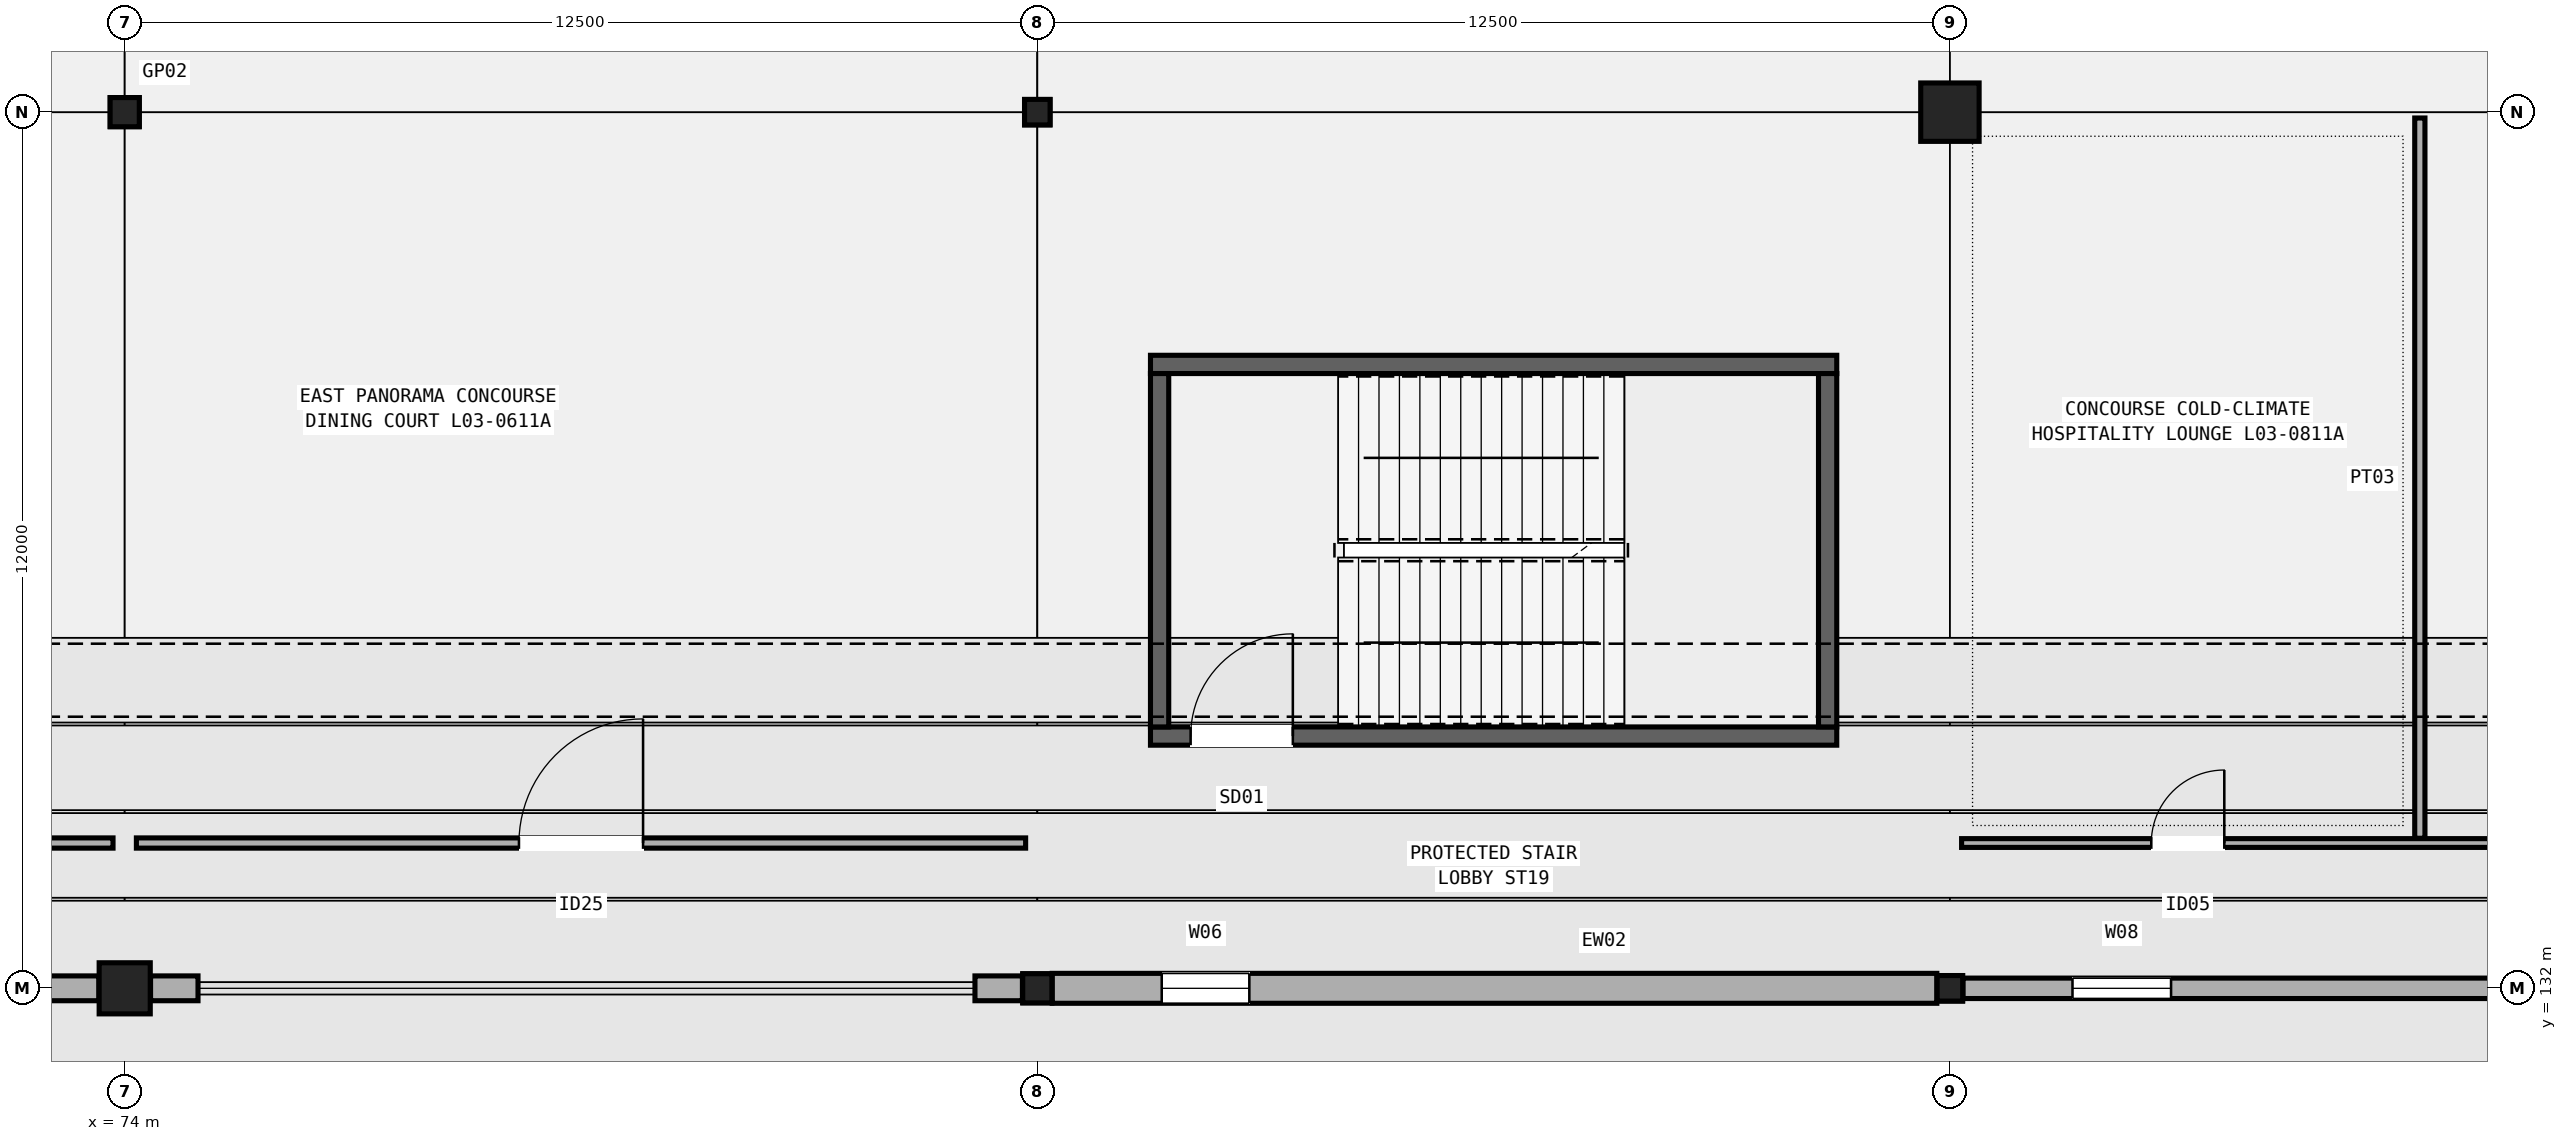
"""IFC4 building model, lengths in metres.
Left out: names, types, materials, properties, quantities, classifications, styles, units other than length and angle.
Written with IfcOpenShell. Run it as: python <this file> out.ifc"""

import sys

from ifc_helpers import new_model, si_unit, direction, frame, frame_2d, origin, origin_2d, place, context, subcontext, project, spatial, rectangle, hollow_rectangle, extrude, element, fill, save


model = new_model("IFC4")
c1 = context("Model", 3, precision=1e-05, world=origin(), true_north=direction((0.0, 1.0)))
c2 = subcontext(c1, "Body", "Model", "MODEL_VIEW")
j1 = project(units=[si_unit("LENGTHUNIT", "METRE"), si_unit("PLANEANGLEUNIT", "RADIAN")], contexts=[c1])
p1 = place(None, origin())
s1 = spatial("IfcSite", under=j1, at=p1, CompositionType="ELEMENT")
p2 = place(p1, origin())
s2 = spatial("IfcBuilding", under=s1, at=p2, CompositionType="ELEMENT")
p3 = place(p2, frame((0.0, 0.0, 15.3)))
s3 = spatial("IfcBuildingStorey", under=s2, at=p3, CompositionType="ELEMENT", Elevation=15.3)
p4 = place(p3, frame((74.0, 132.0, 0.0), z_axis=(0.0, 0.0, 1.0), x_axis=(1.0, 0.0, 0.0)))
e1 = element("IfcColumn", 1, at=p4, inside=s3, PredefinedType="COLUMN", context=c2, shape_type="SweptSolid", body=[
    extrude(rectangle(XDim=0.7, YDim=0.7, at=origin_2d()), origin(), (0.0, 0.0, 1.0), 5.1),
])
for number, where, z_axis, x_axis in (
    (2, (74.0, 144.0, 0.0), (0.0, 0.0, 1.0), (1.0, 0.0, 0.0)),
    (3, (86.5, 132.0, 0.0), (0.0, 0.0, 1.0), (1.0, 0.0, 0.0)),
):
    element("IfcColumn", number, at=place(p3, frame(where, z_axis=z_axis, x_axis=x_axis)), inside=s3, PredefinedType="COLUMN", context=c2, shape_type="SweptSolid", body=[
        extrude(hollow_rectangle(XDim=0.4, YDim=0.4, WallThickness=0.016, InnerFilletRadius=0.016, OuterFilletRadius=0.032, at=origin_2d()), origin(), (0.0, 0.0, 1.0), 5.1),
    ])
for number, where, z_axis, x_axis in (
    (4, (86.5, 144.0, 0.0), (0.0, 0.0, 1.0), (1.0, 0.0, 0.0)),
    (5, (99.0, 132.0, 0.0), (0.0, 0.0, 1.0), (1.0, 0.0, 0.0)),
):
    element("IfcColumn", number, at=place(p3, frame(where, z_axis=z_axis, x_axis=x_axis)), inside=s3, PredefinedType="COLUMN", context=c2, shape_type="SweptSolid", body=[
        extrude(hollow_rectangle(XDim=0.35, YDim=0.35, WallThickness=0.016, InnerFilletRadius=0.016, OuterFilletRadius=0.032, at=origin_2d()), origin(), (0.0, 0.0, 1.0), 5.1),
    ])
p5 = place(p3, frame((99.0, 144.0, 0.0), z_axis=(0.0, 0.0, 1.0), x_axis=(1.0, 0.0, 0.0)))
e6 = element("IfcColumn", 6, at=p5, inside=s3, PredefinedType="COLUMN", context=c2, shape_type="SweptSolid", body=[
    extrude(rectangle(XDim=0.8, YDim=0.8, at=origin_2d()), origin(), (0.0, 0.0, 1.0), 5.1),
])
p6 = place(p3, frame((61.904, 132.0, 0.0), z_axis=(0.0, 0.0, 1.0), x_axis=(1.0, 0.0, 0.0)))
e7 = element("IfcWall", 7, at=p6, inside=s3, PredefinedType="SOLIDWALL", context=c2, shape_type="SweptSolid", body=[
    extrude(rectangle(XDim=11.742, YDim=0.34, at=frame_2d((5.871, 0.0))), origin(), (0.0, 0.0, 1.0), 4.16),
])
p7 = place(p6, frame((1.5, 0.0, 0.95)))
e8 = element("IfcOpeningElement", 8, at=p7, cuts=e7, PredefinedType="OPENING", context=c2, shape_type="SweptSolid", body=[
    extrude(rectangle(XDim=3.6, YDim=2.15, at=frame_2d((1.8, 1.075))), frame((0.0, 0.18, 0.0), z_axis=(0.0, -1.0, 0.0), x_axis=(1.0, 0.0, 0.0)), (0.0, 0.0, 1.0), 0.36),
])
for number, where, z_axis, x_axis in (
    (9, (74.354, 132.0, 0.0), (0.0, 0.0, 1.0), (1.0, 0.0, 0.0)),
    (10, (85.646, 132.0, 0.0), (0.0, 0.0, 1.0), (1.0, 0.0, 0.0)),
):
    element("IfcWall", number, at=place(p3, frame(where, z_axis=z_axis, x_axis=x_axis)), inside=s3, PredefinedType="SOLIDWALL", context=c2, shape_type="SweptSolid", body=[
        extrude(rectangle(XDim=0.65, YDim=0.34, at=frame_2d((0.325, 0.0))), origin(), (0.0, 0.0, 1.0), 4.172),
    ])
p8 = place(p3, frame((86.704, 132.0, 0.0), z_axis=(0.0, 0.0, 1.0), x_axis=(1.0, 0.0, 0.0)))
e11 = element("IfcWall", 11, at=p8, inside=s3, PredefinedType="SOLIDWALL", context=c2, shape_type="SweptSolid", body=[
    extrude(rectangle(XDim=12.117, YDim=0.41, at=frame_2d((6.059, 0.0))), origin(), (0.0, 0.0, 1.0), 4.06),
])
p9 = place(p8, frame((1.5, 0.0, 0.95)))
e12 = element("IfcOpeningElement", 12, at=p9, cuts=e11, PredefinedType="OPENING", context=c2, shape_type="SweptSolid", body=[
    extrude(rectangle(XDim=1.2, YDim=2.3, at=frame_2d((0.6, 1.15))), frame((0.0, 0.215, 0.0), z_axis=(0.0, -1.0, 0.0), x_axis=(1.0, 0.0, 0.0)), (0.0, 0.0, 1.0), 0.43),
])
p10 = place(p3, frame((99.179, 132.0, 0.0), z_axis=(0.0, 0.0, 1.0), x_axis=(1.0, 0.0, 0.0)))
e13 = element("IfcWall", 13, at=p10, inside=s3, PredefinedType="SOLIDWALL", context=c2, shape_type="SweptSolid", body=[
    extrude(rectangle(XDim=12.417, YDim=0.28, at=frame_2d((6.208, 0.0))), origin(), (0.0, 0.0, 1.0), 4.16),
])
p11 = place(p10, frame((1.5, 0.0, 0.95)))
e14 = element("IfcOpeningElement", 14, at=p11, cuts=e13, PredefinedType="OPENING", context=c2, shape_type="SweptSolid", body=[
    extrude(rectangle(XDim=1.35, YDim=2.4, at=frame_2d((0.675, 1.2))), frame((0.0, 0.15, 0.0), z_axis=(0.0, -1.0, 0.0), x_axis=(1.0, 0.0, 0.0)), (0.0, 0.0, 1.0), 0.3),
])
p12 = place(p3, frame((88.05, 135.455, 0.0), z_axis=(0.0, 0.0, 1.0), x_axis=(1.0, 0.0, 0.0)))
e15 = element("IfcWall", 15, at=p12, inside=s3, PredefinedType="SHEAR", context=c2, shape_type="SweptSolid", body=[
    extrude(rectangle(XDim=9.4, YDim=0.25, at=frame_2d((4.7, 0.0))), origin(), (0.0, 0.0, 1.0), 4.86),
])
p13 = place(p12, frame((0.55, 0.0, 0.0)))
e16 = element("IfcOpeningElement", 16, at=p13, cuts=e15, PredefinedType="OPENING", context=c2, shape_type="SweptSolid", body=[
    extrude(rectangle(XDim=1.4, YDim=2.15, at=frame_2d((0.7, 1.075))), frame((0.0, 0.135, 0.0), z_axis=(0.0, -1.0, 0.0), x_axis=(1.0, 0.0, 0.0)), (0.0, 0.0, 1.0), 0.27),
])
p14 = place(p3, frame((88.05, 140.545, 0.0), z_axis=(0.0, 0.0, 1.0), x_axis=(1.0, 0.0, 0.0)))
e17 = element("IfcWall", 17, at=p14, inside=s3, PredefinedType="SHEAR", context=c2, shape_type="SweptSolid", body=[
    extrude(rectangle(XDim=9.4, YDim=0.25, at=frame_2d((4.7, 0.0))), origin(), (0.0, 0.0, 1.0), 4.86),
])
for number, where, z_axis, x_axis in (
    (18, (88.175, 135.58, 0.0), (0.0, 0.0, 1.0), (0.0, 1.0, 0.0)),
    (19, (97.325, 135.58, 0.0), (0.0, 0.0, 1.0), (0.0, 1.0, 0.0)),
):
    element("IfcWall", number, at=place(p3, frame(where, z_axis=z_axis, x_axis=x_axis)), inside=s3, PredefinedType="SHEAR", context=c2, shape_type="SweptSolid", body=[
        extrude(rectangle(XDim=4.84, YDim=0.25, at=frame_2d((2.42, 0.0))), origin(), (0.0, 0.0, 1.0), 4.86),
    ])
p15 = place(p3, frame((61.66, 133.99, 0.0), z_axis=(0.0, 0.0, 1.0), x_axis=(1.0, 0.0, 0.0)))
e20 = element("IfcWall", 20, at=p15, inside=s3, PredefinedType="PARTITIONING", context=c2, shape_type="SweptSolid", body=[
    extrude(rectangle(XDim=12.18, YDim=0.14, at=frame_2d((6.09, 0.0))), origin(), (0.0, 0.0, 1.0), 2.77),
])
p16 = place(p15, frame((2.294, 0.0, 0.0)))
e21 = element("IfcOpeningElement", 21, at=p16, cuts=e20, PredefinedType="OPENING", context=c2, shape_type="SweptSolid", body=[
    extrude(rectangle(XDim=1.36, YDim=2.25, at=frame_2d((0.68, 1.125))), frame((0.0, 0.08, 0.0), z_axis=(0.0, -1.0, 0.0), x_axis=(1.0, 0.0, 0.0)), (0.0, 0.0, 1.0), 0.16),
])
p17 = place(p15, frame((8.445, 0.0, 0.0)))
e22 = element("IfcOpeningElement", 22, at=p17, cuts=e20, PredefinedType="OPENING", context=c2, shape_type="SweptSolid", body=[
    extrude(rectangle(XDim=1.4, YDim=2.24, at=frame_2d((0.7, 1.12))), frame((0.0, 0.08, 0.0), z_axis=(0.0, -1.0, 0.0), x_axis=(1.0, 0.0, 0.0)), (0.0, 0.0, 1.0), 0.16),
])
p18 = place(p3, frame((74.16, 133.99, 0.0), z_axis=(0.0, 0.0, 1.0), x_axis=(1.0, 0.0, 0.0)))
e23 = element("IfcWall", 23, at=p18, inside=s3, PredefinedType="PARTITIONING", context=c2, shape_type="SweptSolid", body=[
    extrude(rectangle(XDim=12.18, YDim=0.14, at=frame_2d((6.09, 0.0))), origin(), (0.0, 0.0, 1.0), 2.77),
])
p19 = place(p18, frame((5.24, 0.0, 0.0)))
e24 = element("IfcOpeningElement", 24, at=p19, cuts=e23, PredefinedType="OPENING", context=c2, shape_type="SweptSolid", body=[
    extrude(rectangle(XDim=1.7, YDim=2.32, at=frame_2d((0.85, 1.16))), frame((0.0, 0.08, 0.0), z_axis=(0.0, -1.0, 0.0), x_axis=(1.0, 0.0, 0.0)), (0.0, 0.0, 1.0), 0.16),
])
p20 = place(p3, frame((99.16, 133.99, 0.0), z_axis=(0.0, 0.0, 1.0), x_axis=(1.0, 0.0, 0.0)))
e25 = element("IfcWall", 25, at=p20, inside=s3, PredefinedType="PARTITIONING", context=c2, shape_type="SweptSolid", body=[
    extrude(rectangle(XDim=12.68, YDim=0.12, at=frame_2d((6.34, 0.0))), origin(), (0.0, 0.0, 1.0), 2.77),
])
p21 = place(p20, frame((2.598, 0.0, 0.0)))
e26 = element("IfcOpeningElement", 26, at=p21, cuts=e25, PredefinedType="OPENING", context=c2, shape_type="SweptSolid", body=[
    extrude(rectangle(XDim=1.0, YDim=2.14, at=frame_2d((0.5, 1.07))), frame((0.0, 0.07, 0.0), z_axis=(0.0, -1.0, 0.0), x_axis=(1.0, 0.0, 0.0)), (0.0, 0.0, 1.0), 0.14),
])
p22 = place(p20, frame((9.003, 0.0, 0.0)))
e27 = element("IfcOpeningElement", 27, at=p22, cuts=e25, PredefinedType="OPENING", context=c2, shape_type="SweptSolid", body=[
    extrude(rectangle(XDim=1.03, YDim=2.12, at=frame_2d((0.515, 1.06))), frame((0.0, 0.07, 0.0), z_axis=(0.0, -1.0, 0.0), x_axis=(1.0, 0.0, 0.0)), (0.0, 0.0, 1.0), 0.14),
])
p23 = place(p3, frame((105.437, 134.055, 0.0), z_axis=(0.0, 0.0, 1.0), x_axis=(0.0, 1.0, 0.0)))
e28 = element("IfcWall", 28, at=p23, inside=s3, PredefinedType="PARTITIONING", context=c2, shape_type="SweptSolid", body=[
    extrude(rectangle(XDim=9.865, YDim=0.14, at=frame_2d((4.933, 0.0))), origin(), (0.0, 0.0, 1.0), 2.77),
])
p24 = place(p9, origin())
e29 = element("IfcWindow", 29, at=p24, inside=s3, PartitioningType="SINGLE_PANEL", PredefinedType="WINDOW", context=c2, shape_type="SweptSolid", body=[
    extrude(rectangle(XDim=1.2, YDim=2.3, at=frame_2d((0.6, 1.15))), frame((0.0, 0.03, 0.0), z_axis=(0.0, -1.0, 0.0), x_axis=(1.0, 0.0, 0.0)), (0.0, 0.0, 1.0), 0.06),
])
fill(e12, e29)
p25 = place(p11, origin())
e30 = element("IfcWindow", 30, at=p25, inside=s3, PartitioningType="SINGLE_PANEL", PredefinedType="WINDOW", context=c2, shape_type="SweptSolid", body=[
    extrude(rectangle(XDim=1.35, YDim=2.4, at=frame_2d((0.675, 1.2))), frame((0.0, 0.03, 0.0), z_axis=(0.0, -1.0, 0.0), x_axis=(1.0, 0.0, 0.0)), (0.0, 0.0, 1.0), 0.06),
])
fill(e14, e30)
p26 = place(p13, origin())
e31 = element("IfcDoor", 31, at=p26, inside=s3, OperationType="SINGLE_SWING_RIGHT", PredefinedType="DOOR", context=c2, shape_type="SweptSolid", body=[
    extrude(rectangle(XDim=1.4, YDim=2.15, at=frame_2d((0.7, 1.075))), frame((0.0, 0.025, 0.0), z_axis=(0.0, -1.0, 0.0), x_axis=(1.0, 0.0, 0.0)), (0.0, 0.0, 1.0), 0.05),
])
fill(e16, e31)
p27 = place(p19, origin())
e32 = element("IfcDoor", 32, at=p27, inside=s3, OperationType="SINGLE_SWING_RIGHT", PredefinedType="DOOR", context=c2, shape_type="SweptSolid", body=[
    extrude(rectangle(XDim=1.7, YDim=2.32, at=frame_2d((0.85, 1.16))), frame((0.0, 0.025, 0.0), z_axis=(0.0, -1.0, 0.0), x_axis=(1.0, 0.0, 0.0)), (0.0, 0.0, 1.0), 0.05),
])
fill(e24, e32)
p28 = place(p21, origin())
e33 = element("IfcDoor", 33, at=p28, inside=s3, OperationType="SINGLE_SWING_RIGHT", PredefinedType="DOOR", context=c2, shape_type="SweptSolid", body=[
    extrude(rectangle(XDim=1.0, YDim=2.14, at=frame_2d((0.5, 1.07))), frame((0.0, 0.025, 0.0), z_axis=(0.0, -1.0, 0.0), x_axis=(1.0, 0.0, 0.0)), (0.0, 0.0, 1.0), 0.05),
])
fill(e26, e33)
save(model, sys.argv[1])
